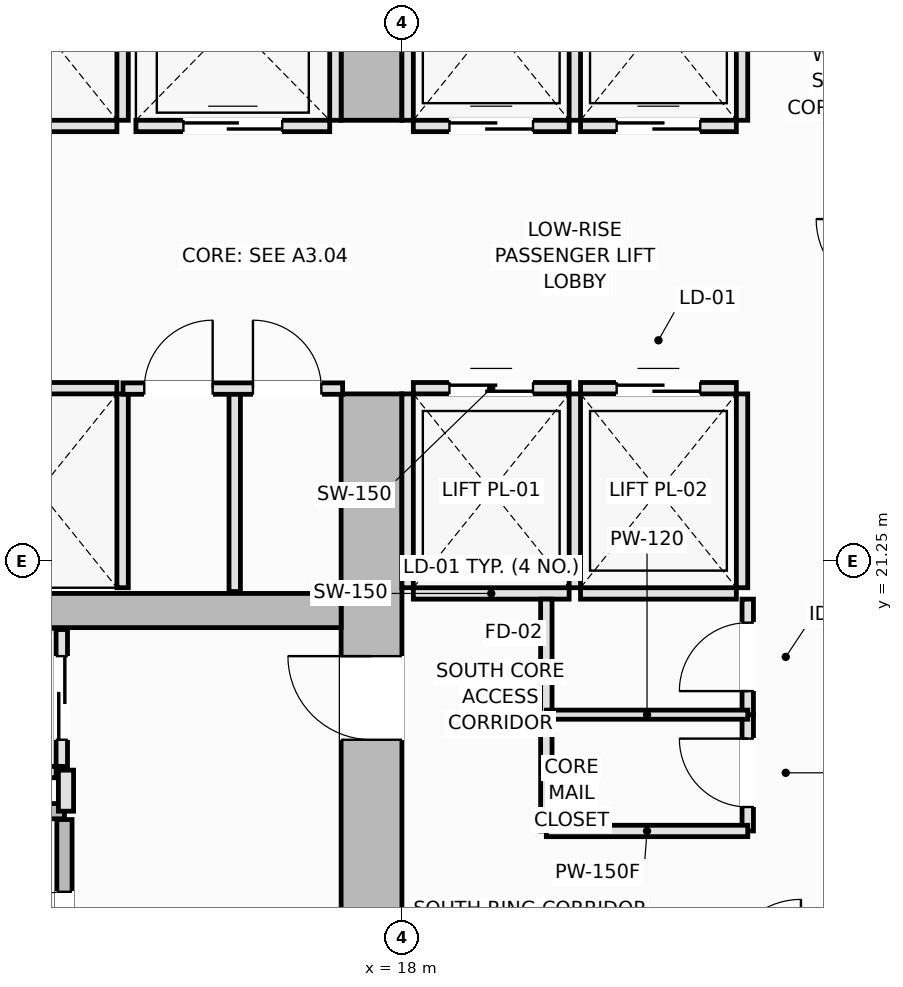
"""IFC4 building model, lengths in metres.
Left out: names, types, materials, properties, quantities, classifications, styles, units other than length and angle.
Written with IfcOpenShell. Run it as: python <this file> out.ifc"""

import sys

from ifc_helpers import new_model, si_unit, direction, frame, frame_2d, origin, place, context, subcontext, project, spatial, rectangle, extrude, element, fill, save


model = new_model("IFC4")
c1 = context("Model", 3, precision=1e-05, world=origin(), true_north=direction((0.0, 1.0)))
c2 = subcontext(c1, "Body", "Model", "MODEL_VIEW")
j1 = project(units=[si_unit("LENGTHUNIT", "METRE"), si_unit("PLANEANGLEUNIT", "RADIAN")], contexts=[c1])
p1 = place(None, origin())
s1 = spatial("IfcSite", under=j1, at=p1, CompositionType="ELEMENT")
p2 = place(p1, origin())
s2 = spatial("IfcBuilding", under=s1, at=p2, CompositionType="ELEMENT")
p3 = place(p2, frame((0.0, 0.0, 68.2)))
s3 = spatial("IfcBuildingStorey", under=s2, at=p3, CompositionType="ELEMENT", Elevation=68.2)
p4 = place(p3, frame((17.6, 14.8, 0.0), z_axis=(0.0, 0.0, 1.0), x_axis=(0.0, 1.0, 0.0)))
e1 = element("IfcWall", 1, at=p4, inside=s3, PredefinedType="SHEAR", context=c2, shape_type="SweptSolid", body=[
    extrude(rectangle(XDim=8.65, YDim=0.8, at=frame_2d((4.325, 0.0))), origin(), (0.0, 0.0, 1.0), 3.55),
])
p5 = place(p4, frame((4.1, 0.0, 0.0)))
e2 = element("IfcOpeningElement", 2, at=p5, cuts=e1, PredefinedType="OPENING", context=c2, shape_type="SweptSolid", body=[
    extrude(rectangle(XDim=1.1, YDim=2.15, at=frame_2d((0.55, 1.075))), frame((0.0, 0.41, 0.0), z_axis=(0.0, -1.0, 0.0), x_axis=(1.0, 0.0, 0.0)), (0.0, 0.0, 1.0), 0.82),
])
p6 = place(p3, frame((17.6, 27.05, 0.0), z_axis=(0.0, 0.0, 1.0), x_axis=(0.0, 1.0, 0.0)))
e3 = element("IfcWall", 3, at=p6, inside=s3, PredefinedType="SHEAR", context=c2, shape_type="SweptSolid", body=[
    extrude(rectangle(XDim=8.65, YDim=0.8, at=frame_2d((4.325, 0.0))), origin(), (0.0, 0.0, 1.0), 3.55),
])
p7 = place(p6, frame((3.45, 0.0, 0.0)))
e4 = element("IfcOpeningElement", 4, at=p7, cuts=e3, PredefinedType="OPENING", context=c2, shape_type="SweptSolid", body=[
    extrude(rectangle(XDim=1.1, YDim=2.15, at=frame_2d((0.55, 1.075))), frame((0.0, 0.41, 0.0), z_axis=(0.0, -1.0, 0.0), x_axis=(1.0, 0.0, 0.0)), (0.0, 0.0, 1.0), 0.82),
])
p8 = place(p3, frame((5.3, 20.6, 0.0), z_axis=(0.0, 0.0, 1.0), x_axis=(1.0, 0.0, 0.0)))
e5 = element("IfcWall", 5, at=p8, inside=s3, PredefinedType="SHEAR", context=c2, shape_type="SweptSolid", body=[
    extrude(rectangle(XDim=11.9, YDim=0.45, at=frame_2d((5.95, 0.0))), origin(), (0.0, 0.0, 1.0), 3.55),
])
p9 = place(p3, frame((5.9, 17.96, 0.0), z_axis=(0.0, 0.0, 1.0), x_axis=(1.0, 0.0, 0.0)))
e6 = element("IfcWall", 6, at=p9, inside=s3, PredefinedType="SOLIDWALL", context=c2, shape_type="SweptSolid", body=[
    extrude(rectangle(XDim=7.66, YDim=0.2, at=frame_2d((3.83, 0.0))), origin(), (0.0, 0.0, 1.0), 3.55),
])
p10 = place(p3, frame((13.56, 14.8, 0.0), z_axis=(0.0, 0.0, 1.0), x_axis=(0.0, 1.0, 0.0)))
e7 = element("IfcWall", 7, at=p10, inside=s3, PredefinedType="SOLIDWALL", context=c2, shape_type="SweptSolid", body=[
    extrude(rectangle(XDim=3.05, YDim=0.2, at=frame_2d((1.525, 0.0))), origin(), (0.0, 0.0, 1.0), 3.55),
])
p11 = place(p10, frame((0.95, 0.0, 0.0)))
e8 = element("IfcOpeningElement", 8, at=p11, cuts=e7, PredefinedType="OPENING", context=c2, shape_type="SweptSolid", body=[
    extrude(rectangle(XDim=1.15, YDim=2.15, at=frame_2d((0.575, 1.075))), frame((0.0, 0.11, 0.0), z_axis=(0.0, -1.0, 0.0), x_axis=(1.0, 0.0, 0.0)), (0.0, 0.0, 1.0), 0.22),
])
p12 = place(p3, frame((18.15, 20.825, 0.0), z_axis=(0.0, 0.0, 1.0), x_axis=(1.0, 0.0, 0.0)))
e9 = element("IfcWall", 9, at=p12, inside=s3, PredefinedType="PARTITIONING", context=c2, shape_type="SweptSolid", body=[
    extrude(rectangle(XDim=2.05, YDim=0.15, at=frame_2d((1.025, 0.0))), origin(), (0.0, 0.0, 1.0), 3.37),
])
p13 = place(p3, frame((18.15, 23.525, 0.0), z_axis=(0.0, 0.0, 1.0), x_axis=(1.0, 0.0, 0.0)))
e10 = element("IfcWall", 10, at=p13, inside=s3, PredefinedType="PARTITIONING", context=c2, shape_type="SweptSolid", body=[
    extrude(rectangle(XDim=2.05, YDim=0.15, at=frame_2d((1.025, 0.0))), origin(), (0.0, 0.0, 1.0), 3.37),
])
p14 = place(p13, frame((0.475, 0.0, 0.0)))
e11 = element("IfcOpeningElement", 11, at=p14, cuts=e10, PredefinedType="OPENING", context=c2, shape_type="SweptSolid", body=[
    extrude(rectangle(XDim=1.1, YDim=2.2, at=frame_2d((0.55, 1.1))), frame((0.0, 0.085, 0.0), z_axis=(0.0, -1.0, 0.0), x_axis=(1.0, 0.0, 0.0)), (0.0, 0.0, 1.0), 0.17),
])
for number, where, z_axis, x_axis in (
    (12, (18.075, 20.9, 0.0), (0.0, 0.0, 1.0), (0.0, 1.0, 0.0)),
    (13, (20.275, 20.9, 0.0), (0.0, 0.0, 1.0), (0.0, 1.0, 0.0)),
):
    element("IfcWall", number, at=place(p3, frame(where, z_axis=z_axis, x_axis=x_axis)), inside=s3, PredefinedType="PARTITIONING", context=c2, shape_type="SweptSolid", body=[
        extrude(rectangle(XDim=2.55, YDim=0.15, at=frame_2d((1.275, 0.0))), origin(), (0.0, 0.0, 1.0), 3.37),
    ])
p15 = place(p3, frame((20.35, 20.825, 0.0), z_axis=(0.0, 0.0, 1.0), x_axis=(1.0, 0.0, 0.0)))
e14 = element("IfcWall", 14, at=p15, inside=s3, PredefinedType="PARTITIONING", context=c2, shape_type="SweptSolid", body=[
    extrude(rectangle(XDim=2.05, YDim=0.15, at=frame_2d((1.025, 0.0))), origin(), (0.0, 0.0, 1.0), 3.37),
])
p16 = place(p3, frame((20.35, 23.525, 0.0), z_axis=(0.0, 0.0, 1.0), x_axis=(1.0, 0.0, 0.0)))
e15 = element("IfcWall", 15, at=p16, inside=s3, PredefinedType="PARTITIONING", context=c2, shape_type="SweptSolid", body=[
    extrude(rectangle(XDim=2.05, YDim=0.15, at=frame_2d((1.025, 0.0))), origin(), (0.0, 0.0, 1.0), 3.37),
])
p17 = place(p16, frame((0.475, 0.0, 0.0)))
e16 = element("IfcOpeningElement", 16, at=p17, cuts=e15, PredefinedType="OPENING", context=c2, shape_type="SweptSolid", body=[
    extrude(rectangle(XDim=1.1, YDim=2.2, at=frame_2d((0.55, 1.1))), frame((0.0, 0.085, 0.0), z_axis=(0.0, -1.0, 0.0), x_axis=(1.0, 0.0, 0.0)), (0.0, 0.0, 1.0), 0.17),
])
p18 = place(p3, frame((22.475, 20.9, 0.0), z_axis=(0.0, 0.0, 1.0), x_axis=(0.0, 1.0, 0.0)))
e17 = element("IfcWall", 17, at=p18, inside=s3, PredefinedType="PARTITIONING", context=c2, shape_type="SweptSolid", body=[
    extrude(rectangle(XDim=2.55, YDim=0.15, at=frame_2d((1.275, 0.0))), origin(), (0.0, 0.0, 1.0), 3.37),
])
p19 = place(p3, frame((18.15, 26.975, 0.0), z_axis=(0.0, 0.0, 1.0), x_axis=(1.0, 0.0, 0.0)))
e18 = element("IfcWall", 18, at=p19, inside=s3, PredefinedType="PARTITIONING", context=c2, shape_type="SweptSolid", body=[
    extrude(rectangle(XDim=2.05, YDim=0.15, at=frame_2d((1.025, 0.0))), origin(), (0.0, 0.0, 1.0), 3.37),
])
p20 = place(p19, frame((0.475, 0.0, 0.0)))
e19 = element("IfcOpeningElement", 19, at=p20, cuts=e18, PredefinedType="OPENING", context=c2, shape_type="SweptSolid", body=[
    extrude(rectangle(XDim=1.1, YDim=2.2, at=frame_2d((0.55, 1.1))), frame((0.0, 0.085, 0.0), z_axis=(0.0, -1.0, 0.0), x_axis=(1.0, 0.0, 0.0)), (0.0, 0.0, 1.0), 0.17),
])
for number, where, z_axis, x_axis in (
    (20, (18.075, 27.05, 0.0), (0.0, 0.0, 1.0), (0.0, 1.0, 0.0)),
    (21, (20.275, 27.05, 0.0), (0.0, 0.0, 1.0), (0.0, 1.0, 0.0)),
):
    element("IfcWall", number, at=place(p3, frame(where, z_axis=z_axis, x_axis=x_axis)), inside=s3, PredefinedType="PARTITIONING", context=c2, shape_type="SweptSolid", body=[
        extrude(rectangle(XDim=2.55, YDim=0.15, at=frame_2d((1.275, 0.0))), origin(), (0.0, 0.0, 1.0), 3.37),
    ])
p21 = place(p3, frame((20.35, 26.975, 0.0), z_axis=(0.0, 0.0, 1.0), x_axis=(1.0, 0.0, 0.0)))
e22 = element("IfcWall", 22, at=p21, inside=s3, PredefinedType="PARTITIONING", context=c2, shape_type="SweptSolid", body=[
    extrude(rectangle(XDim=2.05, YDim=0.15, at=frame_2d((1.025, 0.0))), origin(), (0.0, 0.0, 1.0), 3.37),
])
p22 = place(p21, frame((0.475, 0.0, 0.0)))
e23 = element("IfcOpeningElement", 23, at=p22, cuts=e22, PredefinedType="OPENING", context=c2, shape_type="SweptSolid", body=[
    extrude(rectangle(XDim=1.1, YDim=2.2, at=frame_2d((0.55, 1.1))), frame((0.0, 0.085, 0.0), z_axis=(0.0, -1.0, 0.0), x_axis=(1.0, 0.0, 0.0)), (0.0, 0.0, 1.0), 0.17),
])
p23 = place(p3, frame((22.475, 27.05, 0.0), z_axis=(0.0, 0.0, 1.0), x_axis=(0.0, 1.0, 0.0)))
e24 = element("IfcWall", 24, at=p23, inside=s3, PredefinedType="PARTITIONING", context=c2, shape_type="SweptSolid", body=[
    extrude(rectangle(XDim=2.55, YDim=0.15, at=frame_2d((1.275, 0.0))), origin(), (0.0, 0.0, 1.0), 3.37),
])
p24 = place(p3, frame((12.2, 23.525, 0.0), z_axis=(0.0, 0.0, 1.0), x_axis=(1.0, 0.0, 0.0)))
e25 = element("IfcWall", 25, at=p24, inside=s3, PredefinedType="PARTITIONING", context=c2, shape_type="SweptSolid", body=[
    extrude(rectangle(XDim=2.05, YDim=0.15, at=frame_2d((1.025, 0.0))), origin(), (0.0, 0.0, 1.0), 3.37),
])
p25 = place(p3, frame((14.325, 20.9, 0.0), z_axis=(0.0, 0.0, 1.0), x_axis=(0.0, 1.0, 0.0)))
e26 = element("IfcWall", 26, at=p25, inside=s3, PredefinedType="PARTITIONING", context=c2, shape_type="SweptSolid", body=[
    extrude(rectangle(XDim=2.55, YDim=0.15, at=frame_2d((1.275, 0.0))), origin(), (0.0, 0.0, 1.0), 3.37),
])
p26 = place(p3, frame((12.2, 26.975, 0.0), z_axis=(0.0, 0.0, 1.0), x_axis=(1.0, 0.0, 0.0)))
e27 = element("IfcWall", 27, at=p26, inside=s3, PredefinedType="PARTITIONING", context=c2, shape_type="SweptSolid", body=[
    extrude(rectangle(XDim=2.05, YDim=0.15, at=frame_2d((1.025, 0.0))), origin(), (0.0, 0.0, 1.0), 3.37),
])
p27 = place(p3, frame((14.325, 27.05, 0.0), z_axis=(0.0, 0.0, 1.0), x_axis=(0.0, 1.0, 0.0)))
e28 = element("IfcWall", 28, at=p27, inside=s3, PredefinedType="PARTITIONING", context=c2, shape_type="SweptSolid", body=[
    extrude(rectangle(XDim=2.55, YDim=0.15, at=frame_2d((1.275, 0.0))), origin(), (0.0, 0.0, 1.0), 3.37),
])
p28 = place(p3, frame((14.5, 26.975, 0.0), z_axis=(0.0, 0.0, 1.0), x_axis=(1.0, 0.0, 0.0)))
e29 = element("IfcWall", 29, at=p28, inside=s3, PredefinedType="PARTITIONING", context=c2, shape_type="SweptSolid", body=[
    extrude(rectangle(XDim=2.55, YDim=0.15, at=frame_2d((1.275, 0.0))), origin(), (0.0, 0.0, 1.0), 3.37),
])
p29 = place(p28, frame((0.625, 0.0, 0.0)))
e30 = element("IfcOpeningElement", 30, at=p29, cuts=e29, PredefinedType="OPENING", context=c2, shape_type="SweptSolid", body=[
    extrude(rectangle(XDim=1.3, YDim=2.2, at=frame_2d((0.65, 1.1))), frame((0.0, 0.085, 0.0), z_axis=(0.0, -1.0, 0.0), x_axis=(1.0, 0.0, 0.0)), (0.0, 0.0, 1.0), 0.17),
])
p30 = place(p3, frame((17.125, 27.05, 0.0), z_axis=(0.0, 0.0, 1.0), x_axis=(0.0, 1.0, 0.0)))
e31 = element("IfcWall", 31, at=p30, inside=s3, PredefinedType="PARTITIONING", context=c2, shape_type="SweptSolid", body=[
    extrude(rectangle(XDim=2.6, YDim=0.15, at=frame_2d((1.3, 0.0))), origin(), (0.0, 0.0, 1.0), 3.37),
])
p31 = place(p3, frame((10.95, 18.475, 0.0), z_axis=(0.0, 0.0, 1.0), x_axis=(1.0, 0.0, 0.0)))
e32 = element("IfcWall", 32, at=p31, inside=s3, PredefinedType="PARTITIONING", context=c2, shape_type="SweptSolid", body=[
    extrude(rectangle(XDim=2.5, YDim=0.15, at=frame_2d((1.25, 0.0))), origin(), (0.0, 0.0, 1.0), 3.37),
])
p32 = place(p3, frame((13.525, 18.55, 0.0), z_axis=(0.0, 0.0, 1.0), x_axis=(0.0, 1.0, 0.0)))
e33 = element("IfcWall", 33, at=p32, inside=s3, PredefinedType="PARTITIONING", context=c2, shape_type="SweptSolid", body=[
    extrude(rectangle(XDim=1.8, YDim=0.15, at=frame_2d((0.9, 0.0))), origin(), (0.0, 0.0, 1.0), 3.37),
])
p33 = place(p32, frame((0.35, 0.0, 0.0)))
e34 = element("IfcOpeningElement", 34, at=p33, cuts=e33, PredefinedType="OPENING", context=c2, shape_type="SweptSolid", body=[
    extrude(rectangle(XDim=1.1, YDim=2.2, at=frame_2d((0.55, 1.1))), frame((0.0, 0.085, 0.0), z_axis=(0.0, -1.0, 0.0), x_axis=(1.0, 0.0, 0.0)), (0.0, 0.0, 1.0), 0.17),
])
p34 = place(p3, frame((13.58, 17.96, 0.0), z_axis=(0.0, 0.0, 1.0), x_axis=(0.0, 1.0, 0.0)))
e35 = element("IfcWall", 35, at=p34, inside=s3, PredefinedType="PARTITIONING", context=c2, shape_type="SweptSolid", body=[
    extrude(rectangle(XDim=0.54, YDim=0.2, at=frame_2d((0.27, 0.0))), origin(), (0.0, 0.0, 1.0), 3.37),
])
p35 = place(p3, frame((15.8, 20.85, 0.0), z_axis=(0.0, 0.0, 1.0), x_axis=(0.0, 1.0, 0.0)))
e36 = element("IfcWall", 36, at=p35, inside=s3, PredefinedType="PARTITIONING", context=c2, shape_type="SweptSolid", body=[
    extrude(rectangle(XDim=2.67, YDim=0.15, at=frame_2d((1.335, 0.0))), origin(), (0.0, 0.0, 1.0), 3.37),
])
p36 = place(p3, frame((14.33, 23.52, 0.0), z_axis=(0.0, 0.0, 1.0), x_axis=(1.0, 0.0, 0.0)))
e37 = element("IfcWall", 37, at=p36, inside=s3, PredefinedType="PARTITIONING", context=c2, shape_type="SweptSolid", body=[
    extrude(rectangle(XDim=2.89, YDim=0.15, at=frame_2d((1.445, 0.0))), origin(), (0.0, 0.0, 1.0), 3.37),
])
p37 = place(p36, frame((0.28, 0.0, 0.0)))
e38 = element("IfcOpeningElement", 38, at=p37, cuts=e37, PredefinedType="OPENING", context=c2, shape_type="SweptSolid", body=[
    extrude(rectangle(XDim=0.9, YDim=2.1, at=frame_2d((0.45, 1.05))), frame((0.0, 0.085, 0.0), z_axis=(0.0, -1.0, 0.0), x_axis=(1.0, 0.0, 0.0)), (0.0, 0.0, 1.0), 0.17),
])
p38 = place(p36, frame((1.71, 0.0, 0.0)))
e39 = element("IfcOpeningElement", 39, at=p38, cuts=e37, PredefinedType="OPENING", context=c2, shape_type="SweptSolid", body=[
    extrude(rectangle(XDim=0.9, YDim=2.1, at=frame_2d((0.45, 1.05))), frame((0.0, 0.085, 0.0), z_axis=(0.0, -1.0, 0.0), x_axis=(1.0, 0.0, 0.0)), (0.0, 0.0, 1.0), 0.17),
])
p39 = place(p3, frame((22.55, 17.7, 0.0), z_axis=(0.0, 0.0, 1.0), x_axis=(0.0, 1.0, 0.0)))
e40 = element("IfcWall", 40, at=p39, inside=s3, PredefinedType="PARTITIONING", context=c2, shape_type="SweptSolid", body=[
    extrude(rectangle(XDim=1.53, YDim=0.15, at=frame_2d((0.765, 0.0))), origin(), (0.0, 0.0, 1.0), 3.01),
])
p40 = place(p39, frame((0.315, 0.0, 0.0)))
e41 = element("IfcOpeningElement", 41, at=p40, cuts=e40, PredefinedType="OPENING", context=c2, shape_type="SweptSolid", body=[
    extrude(rectangle(XDim=0.9, YDim=2.1, at=frame_2d((0.45, 1.05))), frame((0.0, 0.085, 0.0), z_axis=(0.0, -1.0, 0.0), x_axis=(1.0, 0.0, 0.0)), (0.0, 0.0, 1.0), 0.17),
])
p41 = place(p3, frame((22.55, 19.23, 0.0), z_axis=(0.0, 0.0, 1.0), x_axis=(0.0, 1.0, 0.0)))
e42 = element("IfcWall", 42, at=p41, inside=s3, PredefinedType="PARTITIONING", context=c2, shape_type="SweptSolid", body=[
    extrude(rectangle(XDim=1.52, YDim=0.15, at=frame_2d((0.76, 0.0))), origin(), (0.0, 0.0, 1.0), 3.01),
])
p42 = place(p41, frame((0.31, 0.0, 0.0)))
e43 = element("IfcOpeningElement", 43, at=p42, cuts=e42, PredefinedType="OPENING", context=c2, shape_type="SweptSolid", body=[
    extrude(rectangle(XDim=0.9, YDim=2.1, at=frame_2d((0.45, 1.05))), frame((0.0, 0.085, 0.0), z_axis=(0.0, -1.0, 0.0), x_axis=(1.0, 0.0, 0.0)), (0.0, 0.0, 1.0), 0.17),
])
p43 = place(p3, frame((19.9, 17.7, 0.0), z_axis=(0.0, 0.0, 1.0), x_axis=(0.0, 1.0, 0.0)))
e44 = element("IfcWall", 44, at=p43, inside=s3, PredefinedType="PARTITIONING", context=c2, shape_type="SweptSolid", body=[
    extrude(rectangle(XDim=1.53, YDim=0.15, at=frame_2d((0.765, 0.0))), origin(), (0.0, 0.0, 1.0), 3.37),
])
p44 = place(p3, frame((19.9, 19.23, 0.0), z_axis=(0.0, 0.0, 1.0), x_axis=(0.0, 1.0, 0.0)))
e45 = element("IfcWall", 45, at=p44, inside=s3, PredefinedType="PARTITIONING", context=c2, shape_type="SweptSolid", body=[
    extrude(rectangle(XDim=1.52, YDim=0.15, at=frame_2d((0.76, 0.0))), origin(), (0.0, 0.0, 1.0), 3.37),
])
p45 = place(p3, frame((19.9, 17.7, 0.0), z_axis=(0.0, 0.0, 1.0), x_axis=(1.0, 0.0, 0.0)))
e46 = element("IfcWall", 46, at=p45, inside=s3, PredefinedType="PARTITIONING", context=c2, shape_type="SweptSolid", body=[
    extrude(rectangle(XDim=2.65, YDim=0.15, at=frame_2d((1.325, 0.0))), origin(), (0.0, 0.0, 1.0), 3.37),
])
p46 = place(p3, frame((19.9, 19.23, 0.0), z_axis=(0.0, 0.0, 1.0), x_axis=(1.0, 0.0, 0.0)))
e47 = element("IfcWall", 47, at=p46, inside=s3, PredefinedType="PARTITIONING", context=c2, shape_type="SweptSolid", body=[
    extrude(rectangle(XDim=2.65, YDim=0.12, at=frame_2d((1.325, 0.0))), origin(), (0.0, 0.0, 1.0), 3.37),
])
p47 = place(p11, origin())
e48 = element("IfcDoor", 48, at=p47, inside=s3, OperationType="SINGLE_SWING_LEFT", PredefinedType="DOOR", context=c2, shape_type="SweptSolid", body=[
    extrude(rectangle(XDim=1.15, YDim=2.15, at=frame_2d((0.575, 1.075))), frame((0.0, 0.025, 0.0), z_axis=(0.0, -1.0, 0.0), x_axis=(1.0, 0.0, 0.0)), (0.0, 0.0, 1.0), 0.05),
])
fill(e8, e48)
p48 = place(p14, origin())
e49 = element("IfcDoor", 49, at=p48, inside=s3, OperationType="DOUBLE_DOOR_SLIDING", PredefinedType="DOOR", context=c2, shape_type="SweptSolid", body=[
    extrude(rectangle(XDim=1.1, YDim=2.2, at=frame_2d((0.55, 1.1))), frame((0.0, 0.025, 0.0), z_axis=(0.0, -1.0, 0.0), x_axis=(1.0, 0.0, 0.0)), (0.0, 0.0, 1.0), 0.05),
])
fill(e11, e49)
p49 = place(p17, origin())
e50 = element("IfcDoor", 50, at=p49, inside=s3, OperationType="DOUBLE_DOOR_SLIDING", PredefinedType="DOOR", context=c2, shape_type="SweptSolid", body=[
    extrude(rectangle(XDim=1.1, YDim=2.2, at=frame_2d((0.55, 1.1))), frame((0.0, 0.025, 0.0), z_axis=(0.0, -1.0, 0.0), x_axis=(1.0, 0.0, 0.0)), (0.0, 0.0, 1.0), 0.05),
])
fill(e16, e50)
p50 = place(p20, origin())
e51 = element("IfcDoor", 51, at=p50, inside=s3, OperationType="DOUBLE_DOOR_SLIDING", PredefinedType="DOOR", context=c2, shape_type="SweptSolid", body=[
    extrude(rectangle(XDim=1.1, YDim=2.2, at=frame_2d((0.55, 1.1))), frame((0.0, 0.025, 0.0), z_axis=(0.0, -1.0, 0.0), x_axis=(1.0, 0.0, 0.0)), (0.0, 0.0, 1.0), 0.05),
])
fill(e19, e51)
p51 = place(p22, origin())
e52 = element("IfcDoor", 52, at=p51, inside=s3, OperationType="DOUBLE_DOOR_SLIDING", PredefinedType="DOOR", context=c2, shape_type="SweptSolid", body=[
    extrude(rectangle(XDim=1.1, YDim=2.2, at=frame_2d((0.55, 1.1))), frame((0.0, 0.025, 0.0), z_axis=(0.0, -1.0, 0.0), x_axis=(1.0, 0.0, 0.0)), (0.0, 0.0, 1.0), 0.05),
])
fill(e23, e52)
p52 = place(p29, origin())
e53 = element("IfcDoor", 53, at=p52, inside=s3, OperationType="DOUBLE_DOOR_SLIDING", PredefinedType="DOOR", context=c2, shape_type="SweptSolid", body=[
    extrude(rectangle(XDim=1.3, YDim=2.2, at=frame_2d((0.65, 1.1))), frame((0.0, 0.025, 0.0), z_axis=(0.0, -1.0, 0.0), x_axis=(1.0, 0.0, 0.0)), (0.0, 0.0, 1.0), 0.05),
])
fill(e30, e53)
p53 = place(p33, origin())
e54 = element("IfcDoor", 54, at=p53, inside=s3, OperationType="DOUBLE_DOOR_SLIDING", PredefinedType="DOOR", context=c2, shape_type="SweptSolid", body=[
    extrude(rectangle(XDim=1.1, YDim=2.2, at=frame_2d((0.55, 1.1))), frame((0.0, 0.025, 0.0), z_axis=(0.0, -1.0, 0.0), x_axis=(1.0, 0.0, 0.0)), (0.0, 0.0, 1.0), 0.05),
])
fill(e34, e54)
p54 = place(p5, origin())
e55 = element("IfcDoor", 55, at=p54, inside=s3, OperationType="SINGLE_SWING_RIGHT", PredefinedType="DOOR", context=c2, shape_type="SweptSolid", body=[
    extrude(rectangle(XDim=1.1, YDim=2.15, at=frame_2d((0.55, 1.075))), frame((0.0, 0.025, 0.0), z_axis=(0.0, -1.0, 0.0), x_axis=(1.0, 0.0, 0.0)), (0.0, 0.0, 1.0), 0.05),
])
fill(e2, e55)
p55 = place(p37, origin())
e56 = element("IfcDoor", 56, at=p55, inside=s3, OperationType="SINGLE_SWING_RIGHT", PredefinedType="DOOR", context=c2, shape_type="SweptSolid", body=[
    extrude(rectangle(XDim=0.9, YDim=2.1, at=frame_2d((0.45, 1.05))), frame((0.0, 0.025, 0.0), z_axis=(0.0, -1.0, 0.0), x_axis=(1.0, 0.0, 0.0)), (0.0, 0.0, 1.0), 0.05),
])
fill(e38, e56)
p56 = place(p38, origin())
e57 = element("IfcDoor", 57, at=p56, inside=s3, OperationType="SINGLE_SWING_LEFT", PredefinedType="DOOR", context=c2, shape_type="SweptSolid", body=[
    extrude(rectangle(XDim=0.9, YDim=2.1, at=frame_2d((0.45, 1.05))), frame((0.0, 0.025, 0.0), z_axis=(0.0, -1.0, 0.0), x_axis=(1.0, 0.0, 0.0)), (0.0, 0.0, 1.0), 0.05),
])
fill(e39, e57)
p57 = place(p40, origin())
e58 = element("IfcDoor", 58, at=p57, inside=s3, OperationType="SINGLE_SWING_RIGHT", PredefinedType="DOOR", context=c2, shape_type="SweptSolid", body=[
    extrude(rectangle(XDim=0.9, YDim=2.1, at=frame_2d((0.45, 1.05))), frame((0.0, 0.025, 0.0), z_axis=(0.0, -1.0, 0.0), x_axis=(1.0, 0.0, 0.0)), (0.0, 0.0, 1.0), 0.05),
])
fill(e41, e58)
p58 = place(p42, origin())
e59 = element("IfcDoor", 59, at=p58, inside=s3, OperationType="SINGLE_SWING_LEFT", PredefinedType="DOOR", context=c2, shape_type="SweptSolid", body=[
    extrude(rectangle(XDim=0.9, YDim=2.1, at=frame_2d((0.45, 1.05))), frame((0.0, 0.025, 0.0), z_axis=(0.0, -1.0, 0.0), x_axis=(1.0, 0.0, 0.0)), (0.0, 0.0, 1.0), 0.05),
])
fill(e43, e59)
save(model, sys.argv[1])
